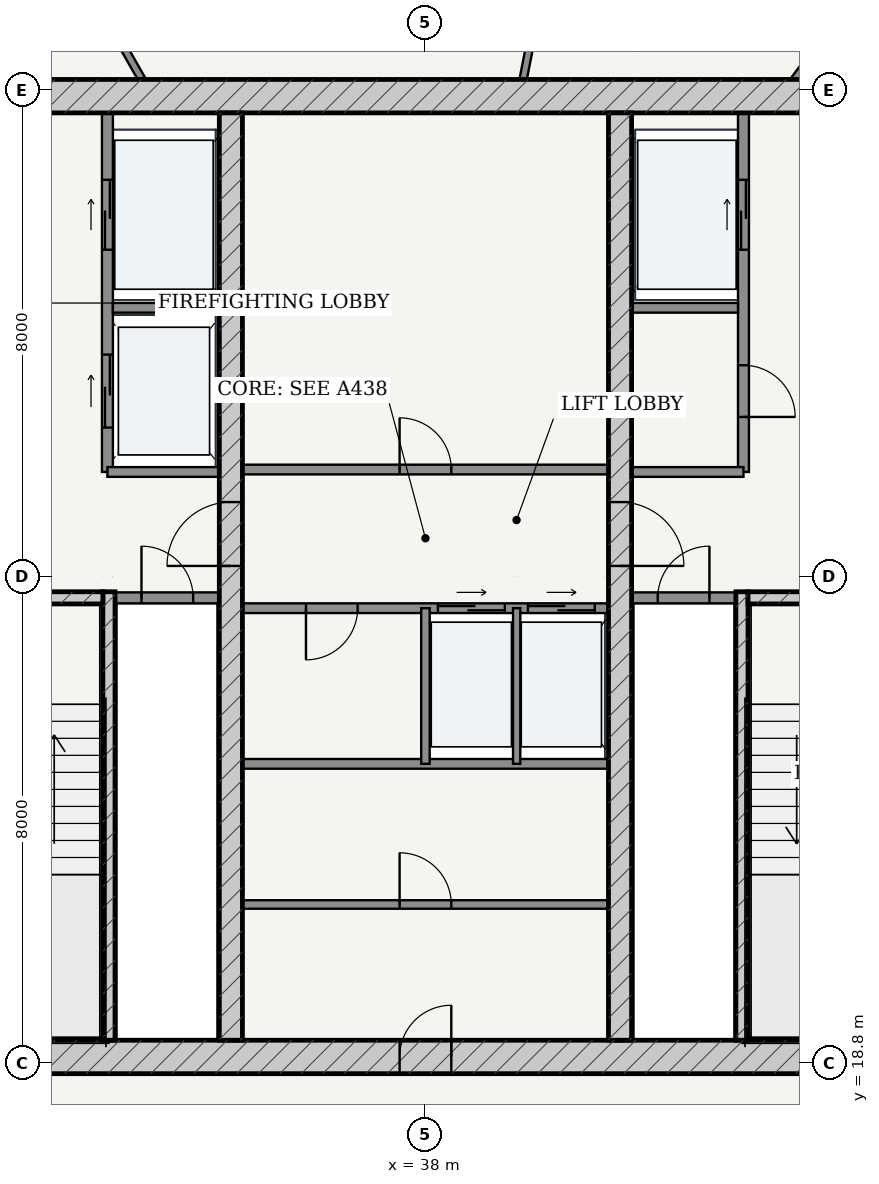
"""IFC4 building model, lengths in metres.
Left out: names, types, materials, properties, quantities, classifications, styles, units other than length and angle.
Written with IfcOpenShell. Run it as: python <this file> out.ifc"""

import sys

from ifc_helpers import new_model, si_unit, direction, frame, frame_2d, origin, place, context, subcontext, project, spatial, rectangle, extrude, source, transform, mapped, element, fill, save


model = new_model("IFC4")
c1 = context("Model", 3, precision=1e-05, world=origin(), true_north=direction((-0.2419218956, 0.970295726276)))
c2 = subcontext(c1, "Body", "Model", "MODEL_VIEW")
j1 = project(units=[si_unit("LENGTHUNIT", "METRE"), si_unit("PLANEANGLEUNIT", "RADIAN")], contexts=[c1])
p1 = place(None, origin())
s1 = spatial("IfcSite", under=j1, at=p1, CompositionType="ELEMENT")
p2 = place(p1, origin())
s2 = spatial("IfcBuilding", under=s1, at=p2, CompositionType="ELEMENT")
p3 = place(p2, frame((0.0, 0.0, 296.95)))
s3 = spatial("IfcBuildingStorey", under=s2, at=p3, CompositionType="ELEMENT", Elevation=296.95)
p4 = place(p3, frame((28.825, 18.9, 0.0), z_axis=(0.0, 0.0, 1.0), x_axis=(1.0, 0.0, 0.0)))
e1 = element("IfcWall", 1, at=p4, inside=s3, PredefinedType="SHEAR", context=c2, shape_type="SweptSolid", body=[
    extrude(rectangle(XDim=18.35, YDim=0.55, at=frame_2d((9.175, 0.0))), origin(), (0.0, 0.0, 1.0), 3.3),
])
p5 = place(p4, frame((8.75, 0.0, 0.0)))
e2 = element("IfcOpeningElement", 2, at=p5, cuts=e1, PredefinedType="OPENING", context=c2, shape_type="SweptSolid", body=[
    extrude(rectangle(XDim=0.85, YDim=2.1, at=frame_2d((0.425, 1.05))), frame((0.0, 0.285, 0.0), z_axis=(0.0, -1.0, 0.0), x_axis=(1.0, 0.0, 0.0)), (0.0, 0.0, 1.0), 0.57),
])
p6 = place(p3, frame((28.825, 34.7, 0.0), z_axis=(0.0, 0.0, 1.0), x_axis=(1.0, 0.0, 0.0)))
e3 = element("IfcWall", 3, at=p6, inside=s3, PredefinedType="SHEAR", context=c2, shape_type="SweptSolid", body=[
    extrude(rectangle(XDim=18.35, YDim=0.55, at=frame_2d((9.175, 0.0))), origin(), (0.0, 0.0, 1.0), 3.3),
])
p7 = place(p3, frame((32.795, 19.175, 0.0), z_axis=(0.0, 0.0, 1.0), x_axis=(0.0, 1.0, 0.0)))
e4 = element("IfcWall", 4, at=p7, inside=s3, PredefinedType="SOLIDWALL", context=c2, shape_type="SweptSolid", body=[
    extrude(rectangle(XDim=7.375, YDim=0.2, at=frame_2d((3.688, 0.0))), origin(), (0.0, 0.0, 1.0), 3.3),
])
p8 = place(p3, frame((29.375, 26.45, 0.0), z_axis=(0.0, 0.0, 1.0), x_axis=(1.0, 0.0, 0.0)))
e5 = element("IfcWall", 5, at=p8, inside=s3, PredefinedType="SOLIDWALL", context=c2, shape_type="SweptSolid", body=[
    extrude(rectangle(XDim=3.32, YDim=0.2, at=frame_2d((1.66, 0.0))), origin(), (0.0, 0.0, 1.0), 3.3),
])
p9 = place(p8, frame((1.185, 0.0, 0.0)))
e6 = element("IfcOpeningElement", 6, at=p9, cuts=e5, PredefinedType="OPENING", context=c2, shape_type="SweptSolid", body=[
    extrude(rectangle(XDim=0.95, YDim=2.15, at=frame_2d((0.475, 1.075))), frame((0.0, 0.11, 0.0), z_axis=(0.0, -1.0, 0.0), x_axis=(1.0, 0.0, 0.0)), (0.0, 0.0, 1.0), 0.22),
])
p10 = place(p3, frame((43.205, 19.175, 0.0), z_axis=(0.0, 0.0, 1.0), x_axis=(0.0, 1.0, 0.0)))
e7 = element("IfcWall", 7, at=p10, inside=s3, PredefinedType="SOLIDWALL", context=c2, shape_type="SweptSolid", body=[
    extrude(rectangle(XDim=7.375, YDim=0.2, at=frame_2d((3.688, 0.0))), origin(), (0.0, 0.0, 1.0), 3.3),
])
p11 = place(p3, frame((43.305, 26.45, 0.0), z_axis=(0.0, 0.0, 1.0), x_axis=(1.0, 0.0, 0.0)))
e8 = element("IfcWall", 8, at=p11, inside=s3, PredefinedType="SOLIDWALL", context=c2, shape_type="SweptSolid", body=[
    extrude(rectangle(XDim=3.32, YDim=0.2, at=frame_2d((1.66, 0.0))), origin(), (0.0, 0.0, 1.0), 3.3),
])
p12 = place(p11, frame((1.185, 0.0, 0.0)))
e9 = element("IfcOpeningElement", 9, at=p12, cuts=e8, PredefinedType="OPENING", context=c2, shape_type="SweptSolid", body=[
    extrude(rectangle(XDim=0.95, YDim=2.15, at=frame_2d((0.475, 1.075))), frame((0.0, 0.11, 0.0), z_axis=(0.0, -1.0, 0.0), x_axis=(1.0, 0.0, 0.0)), (0.0, 0.0, 1.0), 0.22),
])
p13 = place(p3, frame((34.8, 19.175, 0.0), z_axis=(0.0, 0.0, 1.0), x_axis=(0.0, 1.0, 0.0)))
e10 = element("IfcWall", 10, at=p13, inside=s3, PredefinedType="SHEAR", context=c2, shape_type="SweptSolid", body=[
    extrude(rectangle(XDim=15.25, YDim=0.38, at=frame_2d((7.625, 0.0))), origin(), (0.0, 0.0, 1.0), 3.3),
])
p14 = place(p13, frame((7.8, 0.0, 0.0)))
e11 = element("IfcOpeningElement", 11, at=p14, cuts=e10, PredefinedType="OPENING", context=c2, shape_type="SweptSolid", body=[
    extrude(rectangle(XDim=1.05, YDim=2.15, at=frame_2d((0.525, 1.075))), frame((0.0, 0.2, 0.0), z_axis=(0.0, -1.0, 0.0), x_axis=(1.0, 0.0, 0.0)), (0.0, 0.0, 1.0), 0.4),
])
p15 = place(p3, frame((41.2, 19.175, 0.0), z_axis=(0.0, 0.0, 1.0), x_axis=(0.0, 1.0, 0.0)))
e12 = element("IfcWall", 12, at=p15, inside=s3, PredefinedType="SHEAR", context=c2, shape_type="SweptSolid", body=[
    extrude(rectangle(XDim=15.25, YDim=0.38, at=frame_2d((7.625, 0.0))), origin(), (0.0, 0.0, 1.0), 3.3),
])
p16 = place(p15, frame((7.8, 0.0, 0.0)))
e13 = element("IfcOpeningElement", 13, at=p16, cuts=e12, PredefinedType="OPENING", context=c2, shape_type="SweptSolid", body=[
    extrude(rectangle(XDim=1.05, YDim=2.15, at=frame_2d((0.525, 1.075))), frame((0.0, 0.2, 0.0), z_axis=(0.0, -1.0, 0.0), x_axis=(1.0, 0.0, 0.0)), (0.0, 0.0, 1.0), 0.4),
])
p17 = place(p3, frame((32.9, 26.45, 0.0), z_axis=(0.0, 0.0, 1.0), x_axis=(1.0, 0.0, 0.0)))
e14 = element("IfcWall", 14, at=p17, inside=s3, PredefinedType="PARTITIONING", context=c2, shape_type="SweptSolid", body=[
    extrude(rectangle(XDim=1.71, YDim=0.18, at=frame_2d((0.855, 0.0))), origin(), (0.0, 0.0, 1.0), 3.3),
])
p18 = place(p17, frame((0.43, 0.0, 0.0)))
e15 = element("IfcOpeningElement", 15, at=p18, cuts=e14, PredefinedType="OPENING", context=c2, shape_type="SweptSolid", body=[
    extrude(rectangle(XDim=0.85, YDim=2.1, at=frame_2d((0.425, 1.05))), frame((0.0, 0.1, 0.0), z_axis=(0.0, -1.0, 0.0), x_axis=(1.0, 0.0, 0.0)), (0.0, 0.0, 1.0), 0.2),
])
p19 = place(p3, frame((41.39, 26.45, 0.0), z_axis=(0.0, 0.0, 1.0), x_axis=(1.0, 0.0, 0.0)))
e16 = element("IfcWall", 16, at=p19, inside=s3, PredefinedType="PARTITIONING", context=c2, shape_type="SweptSolid", body=[
    extrude(rectangle(XDim=1.71, YDim=0.18, at=frame_2d((0.855, 0.0))), origin(), (0.0, 0.0, 1.0), 3.3),
])
p20 = place(p19, frame((0.43, 0.0, 0.0)))
e17 = element("IfcOpeningElement", 17, at=p20, cuts=e16, PredefinedType="OPENING", context=c2, shape_type="SweptSolid", body=[
    extrude(rectangle(XDim=0.85, YDim=2.1, at=frame_2d((0.425, 1.05))), frame((0.0, 0.1, 0.0), z_axis=(0.0, -1.0, 0.0), x_axis=(1.0, 0.0, 0.0)), (0.0, 0.0, 1.0), 0.2),
])
p21 = place(p3, frame((32.77, 28.52, 0.0), z_axis=(0.0, 0.0, 1.0), x_axis=(0.0, 1.0, 0.0)))
e18 = element("IfcWall", 18, at=p21, inside=s3, PredefinedType="PARTITIONING", context=c2, shape_type="SweptSolid", body=[
    extrude(rectangle(XDim=5.905, YDim=0.18, at=frame_2d((2.953, 0.0))), origin(), (0.0, 0.0, 1.0), 3.3),
])
p22 = place(p21, frame((3.655, 0.0, 0.0)))
e19 = element("IfcOpeningElement", 19, at=p22, cuts=e18, PredefinedType="OPENING", context=c2, shape_type="SweptSolid", body=[
    extrude(rectangle(XDim=1.15, YDim=2.2, at=frame_2d((0.575, 1.1))), frame((0.0, 0.1, 0.0), z_axis=(0.0, -1.0, 0.0), x_axis=(1.0, 0.0, 0.0)), (0.0, 0.0, 1.0), 0.2),
])
p23 = place(p21, frame((0.73, 0.0, 0.0)))
e20 = element("IfcOpeningElement", 20, at=p23, cuts=e18, PredefinedType="OPENING", context=c2, shape_type="SweptSolid", body=[
    extrude(rectangle(XDim=1.2, YDim=2.25, at=frame_2d((0.6, 1.125))), frame((0.0, 0.1, 0.0), z_axis=(0.0, -1.0, 0.0), x_axis=(1.0, 0.0, 0.0)), (0.0, 0.0, 1.0), 0.2),
])
p24 = place(p3, frame((32.86, 31.22, 0.0), z_axis=(0.0, 0.0, 1.0), x_axis=(1.0, 0.0, 0.0)))
e21 = element("IfcWall", 21, at=p24, inside=s3, PredefinedType="PARTITIONING", context=c2, shape_type="SweptSolid", body=[
    extrude(rectangle(XDim=1.75, YDim=0.16, at=frame_2d((0.875, 0.0))), origin(), (0.0, 0.0, 1.0), 3.3),
])
p25 = place(p3, frame((32.77, 28.52, 0.0), z_axis=(0.0, 0.0, 1.0), x_axis=(1.0, 0.0, 0.0)))
e22 = element("IfcWall", 22, at=p25, inside=s3, PredefinedType="PARTITIONING", context=c2, shape_type="SweptSolid", body=[
    extrude(rectangle(XDim=1.84, YDim=0.16, at=frame_2d((0.92, 0.0))), origin(), (0.0, 0.0, 1.0), 3.3),
])
p26 = place(p3, frame((43.23, 28.52, 0.0), z_axis=(0.0, 0.0, 1.0), x_axis=(0.0, 1.0, 0.0)))
e23 = element("IfcWall", 23, at=p26, inside=s3, PredefinedType="PARTITIONING", context=c2, shape_type="SweptSolid", body=[
    extrude(rectangle(XDim=5.905, YDim=0.18, at=frame_2d((2.953, 0.0))), origin(), (0.0, 0.0, 1.0), 3.3),
])
p27 = place(p26, frame((0.905, 0.0, 0.0)))
e24 = element("IfcOpeningElement", 24, at=p27, cuts=e23, PredefinedType="OPENING", context=c2, shape_type="SweptSolid", body=[
    extrude(rectangle(XDim=0.85, YDim=2.1, at=frame_2d((0.425, 1.05))), frame((0.0, 0.1, 0.0), z_axis=(0.0, -1.0, 0.0), x_axis=(1.0, 0.0, 0.0)), (0.0, 0.0, 1.0), 0.2),
])
p28 = place(p26, frame((3.655, 0.0, 0.0)))
e25 = element("IfcOpeningElement", 25, at=p28, cuts=e23, PredefinedType="OPENING", context=c2, shape_type="SweptSolid", body=[
    extrude(rectangle(XDim=1.15, YDim=2.2, at=frame_2d((0.575, 1.1))), frame((0.0, 0.1, 0.0), z_axis=(0.0, -1.0, 0.0), x_axis=(1.0, 0.0, 0.0)), (0.0, 0.0, 1.0), 0.2),
])
p29 = place(p3, frame((41.39, 31.22, 0.0), z_axis=(0.0, 0.0, 1.0), x_axis=(1.0, 0.0, 0.0)))
e26 = element("IfcWall", 26, at=p29, inside=s3, PredefinedType="PARTITIONING", context=c2, shape_type="SweptSolid", body=[
    extrude(rectangle(XDim=1.75, YDim=0.16, at=frame_2d((0.875, 0.0))), origin(), (0.0, 0.0, 1.0), 3.3),
])
p30 = place(p3, frame((41.39, 28.52, 0.0), z_axis=(0.0, 0.0, 1.0), x_axis=(1.0, 0.0, 0.0)))
e27 = element("IfcWall", 27, at=p30, inside=s3, PredefinedType="PARTITIONING", context=c2, shape_type="SweptSolid", body=[
    extrude(rectangle(XDim=1.84, YDim=0.16, at=frame_2d((0.92, 0.0))), origin(), (0.0, 0.0, 1.0), 3.3),
])
p31 = place(p3, frame((34.99, 28.56, 0.0), z_axis=(0.0, 0.0, 1.0), x_axis=(1.0, 0.0, 0.0)))
e28 = element("IfcWall", 28, at=p31, inside=s3, PredefinedType="PARTITIONING", context=c2, shape_type="SweptSolid", body=[
    extrude(rectangle(XDim=6.02, YDim=0.16, at=frame_2d((3.01, 0.0))), origin(), (0.0, 0.0, 1.0), 3.3),
])
p32 = place(p31, frame((2.585, 0.0, 0.0)))
e29 = element("IfcOpeningElement", 29, at=p32, cuts=e28, PredefinedType="OPENING", context=c2, shape_type="SweptSolid", body=[
    extrude(rectangle(XDim=0.85, YDim=2.1, at=frame_2d((0.425, 1.05))), frame((0.0, 0.09, 0.0), z_axis=(0.0, -1.0, 0.0), x_axis=(1.0, 0.0, 0.0)), (0.0, 0.0, 1.0), 0.18),
])
p33 = place(p3, frame((34.99, 26.28, 0.0), z_axis=(0.0, 0.0, 1.0), x_axis=(1.0, 0.0, 0.0)))
e30 = element("IfcWall", 30, at=p33, inside=s3, PredefinedType="PARTITIONING", context=c2, shape_type="SweptSolid", body=[
    extrude(rectangle(XDim=6.02, YDim=0.16, at=frame_2d((3.01, 0.0))), origin(), (0.0, 0.0, 1.0), 3.3),
])
p34 = place(p33, frame((1.045, 0.0, 0.0)))
e31 = element("IfcOpeningElement", 31, at=p34, cuts=e30, PredefinedType="OPENING", context=c2, shape_type="SweptSolid", body=[
    extrude(rectangle(XDim=0.85, YDim=2.1, at=frame_2d((0.425, 1.05))), frame((0.0, 0.09, 0.0), z_axis=(0.0, -1.0, 0.0), x_axis=(1.0, 0.0, 0.0)), (0.0, 0.0, 1.0), 0.18),
])
p35 = place(p33, frame((3.215, 0.0, 0.0)))
e32 = element("IfcOpeningElement", 32, at=p35, cuts=e30, PredefinedType="OPENING", context=c2, shape_type="SweptSolid", body=[
    extrude(rectangle(XDim=1.1, YDim=2.2, at=frame_2d((0.55, 1.1))), frame((0.0, 0.09, 0.0), z_axis=(0.0, -1.0, 0.0), x_axis=(1.0, 0.0, 0.0)), (0.0, 0.0, 1.0), 0.18),
])
p36 = place(p33, frame((4.695, 0.0, 0.0)))
e33 = element("IfcOpeningElement", 33, at=p36, cuts=e30, PredefinedType="OPENING", context=c2, shape_type="SweptSolid", body=[
    extrude(rectangle(XDim=1.1, YDim=2.2, at=frame_2d((0.55, 1.1))), frame((0.0, 0.09, 0.0), z_axis=(0.0, -1.0, 0.0), x_axis=(1.0, 0.0, 0.0)), (0.0, 0.0, 1.0), 0.18),
])
p37 = place(p3, frame((34.99, 23.72, 0.0), z_axis=(0.0, 0.0, 1.0), x_axis=(1.0, 0.0, 0.0)))
e34 = element("IfcWall", 34, at=p37, inside=s3, PredefinedType="PARTITIONING", context=c2, shape_type="SweptSolid", body=[
    extrude(rectangle(XDim=6.02, YDim=0.16, at=frame_2d((3.01, 0.0))), origin(), (0.0, 0.0, 1.0), 3.3),
])
p38 = place(p3, frame((38.0, 23.72, 0.0), z_axis=(0.0, 0.0, 1.0), x_axis=(0.0, 1.0, 0.0)))
e35 = element("IfcWall", 35, at=p38, inside=s3, PredefinedType="PARTITIONING", context=c2, shape_type="SweptSolid", body=[
    extrude(rectangle(XDim=2.56, YDim=0.14, at=frame_2d((1.28, 0.0))), origin(), (0.0, 0.0, 1.0), 3.3),
])
p39 = place(p3, frame((39.5, 23.72, 0.0), z_axis=(0.0, 0.0, 1.0), x_axis=(0.0, 1.0, 0.0)))
e36 = element("IfcWall", 36, at=p39, inside=s3, PredefinedType="PARTITIONING", context=c2, shape_type="SweptSolid", body=[
    extrude(rectangle(XDim=2.56, YDim=0.12, at=frame_2d((1.28, 0.0))), origin(), (0.0, 0.0, 1.0), 3.3),
])
p40 = place(p3, frame((34.99, 21.407, 0.0), z_axis=(0.0, 0.0, 1.0), x_axis=(1.0, 0.0, 0.0)))
e37 = element("IfcWall", 37, at=p40, inside=s3, PredefinedType="PARTITIONING", context=c2, shape_type="SweptSolid", body=[
    extrude(rectangle(XDim=6.02, YDim=0.14, at=frame_2d((3.01, 0.0))), origin(), (0.0, 0.0, 1.0), 3.3),
])
p41 = place(p40, frame((2.585, 0.0, 0.0)))
e38 = element("IfcOpeningElement", 38, at=p41, cuts=e37, PredefinedType="OPENING", context=c2, shape_type="SweptSolid", body=[
    extrude(rectangle(XDim=0.85, YDim=2.1, at=frame_2d((0.425, 1.05))), frame((0.0, 0.08, 0.0), z_axis=(0.0, -1.0, 0.0), x_axis=(1.0, 0.0, 0.0)), (0.0, 0.0, 1.0), 0.16),
])
p42 = place(p3, frame((44.07, 34.977, 0.0), z_axis=(0.0, 0.0, 1.0), x_axis=(0.596034582173, 0.802958764106, 0.0)))
e39 = element("IfcWall", 39, at=p42, inside=s3, PredefinedType="PARTITIONING", context=c2, shape_type="SweptSolid", body=[
    extrude(rectangle(XDim=3.573, YDim=0.12, at=frame_2d((1.786, 0.0))), origin(), (0.0, 0.0, 1.0), 3.019),
])
p43 = place(p42, frame((1.336, 0.0, 0.0)))
e40 = element("IfcOpeningElement", 40, at=p43, cuts=e39, PredefinedType="OPENING", context=c2, shape_type="SweptSolid", body=[
    extrude(rectangle(XDim=0.9, YDim=2.15, at=frame_2d((0.45, 1.075))), frame((0.0, 0.07, 0.0), z_axis=(0.0, -1.0, 0.0), x_axis=(1.0, 0.0, 0.0)), (0.0, 0.0, 1.0), 0.14),
])
p44 = place(p3, frame((39.607, 34.977, 0.0), z_axis=(0.0, 0.0, 1.0), x_axis=(0.192841890083, 0.981229843324, 0.0)))
e41 = element("IfcWall", 41, at=p44, inside=s3, PredefinedType="PARTITIONING", context=c2, shape_type="SweptSolid", body=[
    extrude(rectangle(XDim=2.912, YDim=0.12, at=frame_2d((1.456, 0.0))), origin(), (0.0, 0.0, 1.0), 2.385),
])
p45 = place(p44, frame((1.006, 0.0, 0.0)))
e42 = element("IfcOpeningElement", 42, at=p45, cuts=e41, PredefinedType="OPENING", context=c2, shape_type="SweptSolid", body=[
    extrude(rectangle(XDim=0.9, YDim=2.15, at=frame_2d((0.45, 1.075))), frame((0.0, 0.07, 0.0), z_axis=(0.0, -1.0, 0.0), x_axis=(1.0, 0.0, 0.0)), (0.0, 0.0, 1.0), 0.14),
])
p46 = place(p3, frame((33.336, 34.977, 0.0), z_axis=(0.0, 0.0, 1.0), x_axis=(-0.495413156231, 0.86865747256, 0.0)))
e43 = element("IfcWall", 43, at=p46, inside=s3, PredefinedType="PARTITIONING", context=c2, shape_type="SweptSolid", body=[
    extrude(rectangle(XDim=3.297, YDim=0.12, at=frame_2d((1.649, 0.0))), origin(), (0.0, 0.0, 1.0), 3.3),
])
p47 = place(p46, frame((1.199, 0.0, 0.0)))
e44 = element("IfcOpeningElement", 44, at=p47, cuts=e43, PredefinedType="OPENING", context=c2, shape_type="SweptSolid", body=[
    extrude(rectangle(XDim=0.9, YDim=2.15, at=frame_2d((0.45, 1.075))), frame((0.0, 0.07, 0.0), z_axis=(0.0, -1.0, 0.0), x_axis=(1.0, 0.0, 0.0)), (0.0, 0.0, 1.0), 0.14),
])
m1 = source(origin(), c2, "Body", "SweptSolid", [
    extrude(rectangle(XDim=1.05, YDim=2.15, at=frame_2d((0.525, 1.075))), frame((0.0, 0.025, 0.0), z_axis=(0.0, -1.0, 0.0), x_axis=(1.0, 0.0, 0.0)), (0.0, 0.0, 1.0), 0.05),
])
p48 = place(p14, origin())
e45 = element("IfcDoor", 45, at=p48, inside=s3, OperationType="SINGLE_SWING_LEFT", PredefinedType="DOOR", context=c2, shape_type="MappedRepresentation", body=[
    mapped(m1, transform((0.0, 0.0, 0.0), scale=1.0)),
])
fill(e11, e45)
p49 = place(p16, frame((1.05, 0.0, 0.0), z_axis=(0.0, 0.0, 1.0), x_axis=(-1.0, 0.0, 0.0)))
e46 = element("IfcDoor", 46, at=p49, inside=s3, OperationType="SINGLE_SWING_RIGHT", PredefinedType="DOOR", context=c2, shape_type="MappedRepresentation", body=[
    mapped(m1, transform((0.0, 0.0, 0.0), scale=1.0)),
])
fill(e13, e46)
m2 = source(origin(), c2, "Body", "SweptSolid", [
    extrude(rectangle(XDim=0.85, YDim=2.1, at=frame_2d((0.425, 1.05))), frame((0.0, 0.025, 0.0), z_axis=(0.0, -1.0, 0.0), x_axis=(1.0, 0.0, 0.0)), (0.0, 0.0, 1.0), 0.05),
])
p50 = place(p18, origin())
e47 = element("IfcDoor", 47, at=p50, inside=s3, OperationType="SINGLE_SWING_LEFT", PredefinedType="DOOR", context=c2, shape_type="MappedRepresentation", body=[
    mapped(m2, transform((0.0, 0.0, 0.0), scale=1.0)),
])
fill(e15, e47)
p51 = place(p20, origin())
e48 = element("IfcDoor", 48, at=p51, inside=s3, OperationType="SINGLE_SWING_RIGHT", PredefinedType="DOOR", context=c2, shape_type="MappedRepresentation", body=[
    mapped(m2, transform((0.0, 0.0, 0.0), scale=1.0)),
])
fill(e17, e48)
p52 = place(p27, frame((0.85, 0.0, 0.0), z_axis=(0.0, 0.0, 1.0), x_axis=(-1.0, 0.0, 0.0)))
e49 = element("IfcDoor", 49, at=p52, inside=s3, OperationType="SINGLE_SWING_RIGHT", PredefinedType="DOOR", context=c2, shape_type="MappedRepresentation", body=[
    mapped(m2, transform((0.0, 0.0, 0.0), scale=1.0)),
])
fill(e24, e49)
p53 = place(p32, origin())
e50 = element("IfcDoor", 50, at=p53, inside=s3, OperationType="SINGLE_SWING_LEFT", PredefinedType="DOOR", context=c2, shape_type="MappedRepresentation", body=[
    mapped(m2, transform((0.0, 0.0, 0.0), scale=1.0)),
])
fill(e29, e50)
p54 = place(p34, frame((0.85, 0.0, 0.0), z_axis=(0.0, 0.0, 1.0), x_axis=(-1.0, 0.0, 0.0)))
e51 = element("IfcDoor", 51, at=p54, inside=s3, OperationType="SINGLE_SWING_RIGHT", PredefinedType="DOOR", context=c2, shape_type="MappedRepresentation", body=[
    mapped(m2, transform((0.0, 0.0, 0.0), scale=1.0)),
])
fill(e31, e51)
p55 = place(p5, origin())
e52 = element("IfcDoor", 52, at=p55, inside=s3, OperationType="SINGLE_SWING_RIGHT", PredefinedType="DOOR", context=c2, shape_type="MappedRepresentation", body=[
    mapped(m2, transform((0.0, 0.0, 0.0), scale=1.0)),
])
fill(e2, e52)
p56 = place(p41, origin())
e53 = element("IfcDoor", 53, at=p56, inside=s3, OperationType="SINGLE_SWING_LEFT", PredefinedType="DOOR", context=c2, shape_type="MappedRepresentation", body=[
    mapped(m2, transform((0.0, 0.0, 0.0), scale=1.0)),
])
fill(e38, e53)
m3 = source(origin(), c2, "Body", "SweptSolid", [
    extrude(rectangle(XDim=1.15, YDim=2.2, at=frame_2d((0.575, 1.1))), frame((0.0, 0.025, 0.0), z_axis=(0.0, -1.0, 0.0), x_axis=(1.0, 0.0, 0.0)), (0.0, 0.0, 1.0), 0.05),
])
p57 = place(p22, origin())
e54 = element("IfcDoor", 54, at=p57, inside=s3, OperationType="DOUBLE_DOOR_SLIDING", PredefinedType="DOOR", context=c2, shape_type="MappedRepresentation", body=[
    mapped(m3, transform((0.0, 0.0, 0.0), scale=1.0)),
])
fill(e19, e54)
p58 = place(p28, origin())
e55 = element("IfcDoor", 55, at=p58, inside=s3, OperationType="DOUBLE_DOOR_SLIDING", PredefinedType="DOOR", context=c2, shape_type="MappedRepresentation", body=[
    mapped(m3, transform((0.0, 0.0, 0.0), scale=1.0)),
])
fill(e25, e55)
m4 = source(origin(), c2, "Body", "SweptSolid", [
    extrude(rectangle(XDim=1.2, YDim=2.25, at=frame_2d((0.6, 1.125))), frame((0.0, 0.025, 0.0), z_axis=(0.0, -1.0, 0.0), x_axis=(1.0, 0.0, 0.0)), (0.0, 0.0, 1.0), 0.05),
])
p59 = place(p23, origin())
e56 = element("IfcDoor", 56, at=p59, inside=s3, OperationType="DOUBLE_DOOR_SLIDING", PredefinedType="DOOR", context=c2, shape_type="MappedRepresentation", body=[
    mapped(m4, transform((0.0, 0.0, 0.0), scale=1.0)),
])
fill(e20, e56)
m5 = source(origin(), c2, "Body", "SweptSolid", [
    extrude(rectangle(XDim=1.1, YDim=2.2, at=frame_2d((0.55, 1.1))), frame((0.0, 0.025, 0.0), z_axis=(0.0, -1.0, 0.0), x_axis=(1.0, 0.0, 0.0)), (0.0, 0.0, 1.0), 0.05),
])
p60 = place(p35, origin())
e57 = element("IfcDoor", 57, at=p60, inside=s3, OperationType="DOUBLE_DOOR_SLIDING", PredefinedType="DOOR", context=c2, shape_type="MappedRepresentation", body=[
    mapped(m5, transform((0.0, 0.0, 0.0), scale=1.0)),
])
fill(e32, e57)
p61 = place(p36, origin())
e58 = element("IfcDoor", 58, at=p61, inside=s3, OperationType="DOUBLE_DOOR_SLIDING", PredefinedType="DOOR", context=c2, shape_type="MappedRepresentation", body=[
    mapped(m5, transform((0.0, 0.0, 0.0), scale=1.0)),
])
fill(e33, e58)
save(model, sys.argv[1])
